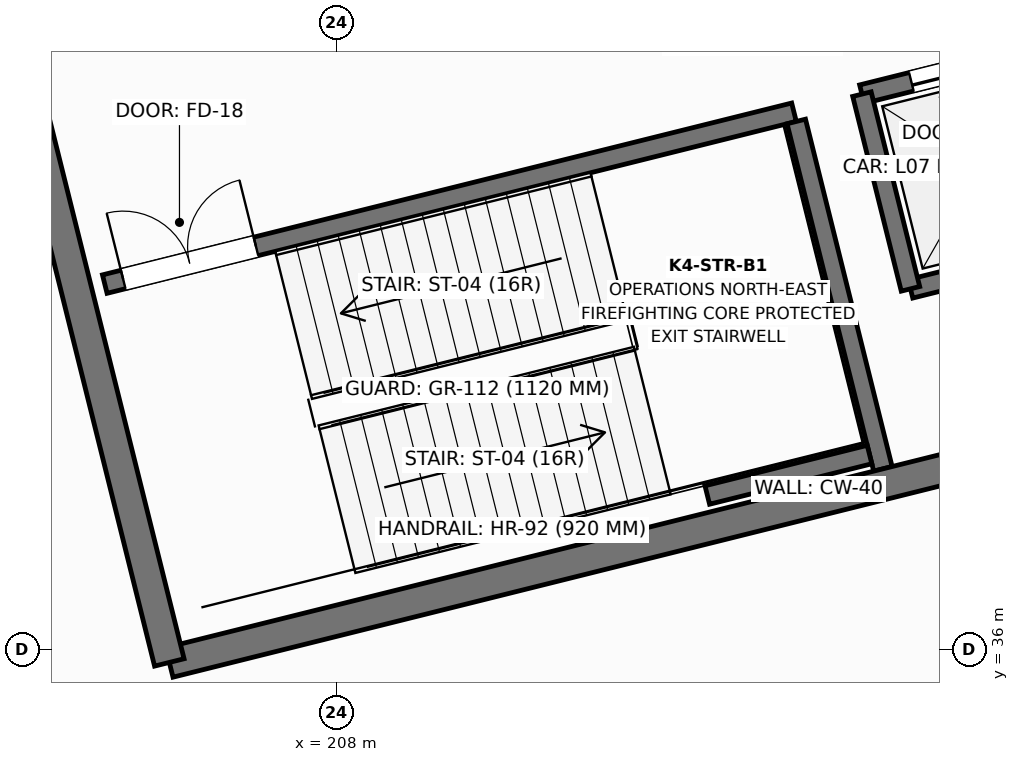
"""IFC4 building model, lengths in metres.
Left out: names, types, materials, properties, quantities, classifications, styles, units other than length and angle.
Written with IfcOpenShell. Run it as: python <this file> out.ifc"""

import sys

from ifc_helpers import new_model, si_unit, direction, frame, frame_2d, origin, origin_2d, place, context, subcontext, project, spatial, rectangle, extrude, element, fill, save


model = new_model("IFC4")
c1 = context("Model", 3, precision=1e-05, world=origin(), true_north=direction((0.0, 1.0)))
c2 = subcontext(c1, "Body", "Model", "MODEL_VIEW")
j1 = project(units=[si_unit("LENGTHUNIT", "METRE"), si_unit("PLANEANGLEUNIT", "RADIAN")], contexts=[c1])
p1 = place(None, origin())
s1 = spatial("IfcSite", under=j1, at=p1, CompositionType="ELEMENT")
p2 = place(p1, origin())
s2 = spatial("IfcBuilding", under=s1, at=p2, CompositionType="ELEMENT")
p3 = place(p2, frame((0.0, 0.0, -5.4)))
s3 = spatial("IfcBuildingStorey", under=s2, at=p3, CompositionType="ELEMENT", Elevation=-5.4)
p4 = place(p3, frame((214.044, 36.652, 0.0), z_axis=(0.0, 0.0, 1.0), x_axis=(0.970295726276, 0.2419218956, 0.0)))
e1 = element("IfcColumn", 1, at=p4, inside=s3, PredefinedType="COLUMN", context=c2, shape_type="SweptSolid", body=[
    extrude(rectangle(XDim=1.1, YDim=1.1, at=origin_2d()), origin(), (0.0, 0.0, 1.0), 5.4),
])
p5 = place(p3, frame((215.548, 40.748, 0.0), z_axis=(0.0, 0.0, 1.0), x_axis=(0.97029284861, 0.241933436994, 0.0)))
e2 = element("IfcWall", 2, at=p5, inside=s3, PredefinedType="SOLIDWALL", context=c2, shape_type="SweptSolid", body=[
    extrude(rectangle(XDim=2.54, YDim=0.25, at=frame_2d((1.27, 0.0))), origin(), (0.0, 0.0, 1.0), 5.02),
])
p6 = place(p3, frame((217.374, 43.924, 0.0), z_axis=(0.0, 0.0, 1.0), x_axis=(-0.97029284861, -0.241933436994, 0.0)))
e3 = element("IfcWall", 3, at=p6, inside=s3, PredefinedType="SOLIDWALL", context=c2, shape_type="SweptSolid", body=[
    extrude(rectangle(XDim=2.54, YDim=0.25, at=frame_2d((1.27, 0.0))), origin(), (0.0, 0.0, 1.0), 5.02),
])
p7 = place(p6, frame((0.67, 0.0, 0.0)))
e4 = element("IfcOpeningElement", 4, at=p7, cuts=e3, PredefinedType="OPENING", context=c2, shape_type="SweptSolid", body=[
    extrude(rectangle(XDim=1.2, YDim=2.2, at=frame_2d((0.6, 1.1))), frame((0.0, 0.135, 0.0), z_axis=(0.0, -1.0, 0.0), x_axis=(1.0, 0.0, 0.0)), (0.0, 0.0, 1.0), 0.27),
])
p8 = place(p3, frame((214.909, 43.309, 0.0), z_axis=(0.0, 0.0, 1.0), x_axis=(0.241938414856, -0.970291607413, 0.0)))
e5 = element("IfcWall", 5, at=p8, inside=s3, PredefinedType="SOLIDWALL", context=c2, shape_type="SweptSolid", body=[
    extrude(rectangle(XDim=2.64, YDim=0.25, at=frame_2d((1.32, 0.0))), origin(), (0.0, 0.0, 1.0), 5.02),
])
p9 = place(p3, frame((204.948, 40.81, 0.0), z_axis=(0.0, 0.0, 1.0), x_axis=(0.970297151331, 0.241916179943, 0.0)))
e6 = element("IfcWall", 6, at=p9, inside=s3, PredefinedType="SOLIDWALL", context=c2, shape_type="SweptSolid", body=[
    extrude(rectangle(XDim=9.345, YDim=0.25, at=frame_2d((4.673, 0.0))), origin(), (0.0, 0.0, 1.0), 5.02),
])
p10 = place(p9, frame((0.25, 0.0, 0.0)))
e7 = element("IfcOpeningElement", 7, at=p10, cuts=e6, PredefinedType="OPENING", context=c2, shape_type="SweptSolid", body=[
    extrude(rectangle(XDim=1.8, YDim=2.25, at=frame_2d((0.9, 1.125))), frame((0.0, 0.135, 0.0), z_axis=(0.0, -1.0, 0.0), x_axis=(1.0, 0.0, 0.0)), (0.0, 0.0, 1.0), 0.27),
])
p11 = place(p3, frame((215.185, 38.38, 0.0), z_axis=(0.0, 0.0, 1.0), x_axis=(-0.241911120435, 0.970298412763, 0.0)))
e8 = element("IfcWall", 8, at=p11, inside=s3, PredefinedType="SOLIDWALL", context=c2, shape_type="SweptSolid", body=[
    extrude(rectangle(XDim=4.71, YDim=0.25, at=frame_2d((2.355, 0.0))), origin(), (0.0, 0.0, 1.0), 5.02),
])
p12 = place(p3, frame((212.875, 38.035, 0.0), z_axis=(0.0, 0.0, 1.0), x_axis=(0.97029738597, 0.241915238833, 0.0)))
e9 = element("IfcWall", 9, at=p12, inside=s3, PredefinedType="SOLIDWALL", context=c2, shape_type="SweptSolid", body=[
    extrude(rectangle(XDim=2.2, YDim=0.25, at=frame_2d((1.1, 0.0))), origin(), (0.0, 0.0, 1.0), 5.02),
])
p13 = place(p3, frame((205.797, 35.833, 0.0), z_axis=(0.0, 0.0, 1.0), x_axis=(0.970295179998, 0.241924086589, 0.0)))
e10 = element("IfcWall", 10, at=p13, inside=s3, PredefinedType="SHEAR", context=c2, shape_type="SweptSolid", body=[
    extrude(rectangle(XDim=17.2, YDim=0.4, at=frame_2d((8.6, 0.0))), origin(), (0.0, 0.0, 1.0), 5.02),
])
p14 = place(p3, frame((203.62, 44.566, 0.0), z_axis=(0.0, 0.0, 1.0), x_axis=(0.241921199913, -0.97029589973, 0.0)))
e11 = element("IfcWall", 11, at=p14, inside=s3, PredefinedType="SHEAR", context=c2, shape_type="SweptSolid", body=[
    extrude(rectangle(XDim=9.0, YDim=0.4, at=frame_2d((4.5, 0.0))), origin(), (0.0, 0.0, 1.0), 5.02),
])
p15 = place(p7, origin())
e12 = element("IfcDoor", 12, at=p15, inside=s3, OperationType="SLIDING_TO_LEFT", PredefinedType="DOOR", context=c2, shape_type="SweptSolid", body=[
    extrude(rectangle(XDim=1.2, YDim=2.2, at=frame_2d((0.6, 1.1))), frame((0.0, 0.025, 0.0), z_axis=(0.0, -1.0, 0.0), x_axis=(1.0, 0.0, 0.0)), (0.0, 0.0, 1.0), 0.05),
])
fill(e4, e12)
p16 = place(p10, origin())
e13 = element("IfcDoor", 13, at=p16, inside=s3, OperationType="DOUBLE_DOOR_SINGLE_SWING", PredefinedType="DOOR", context=c2, shape_type="SweptSolid", body=[
    extrude(rectangle(XDim=1.8, YDim=2.25, at=frame_2d((0.9, 1.125))), frame((0.0, 0.025, 0.0), z_axis=(0.0, -1.0, 0.0), x_axis=(1.0, 0.0, 0.0)), (0.0, 0.0, 1.0), 0.05),
])
fill(e7, e13)
save(model, sys.argv[1])
